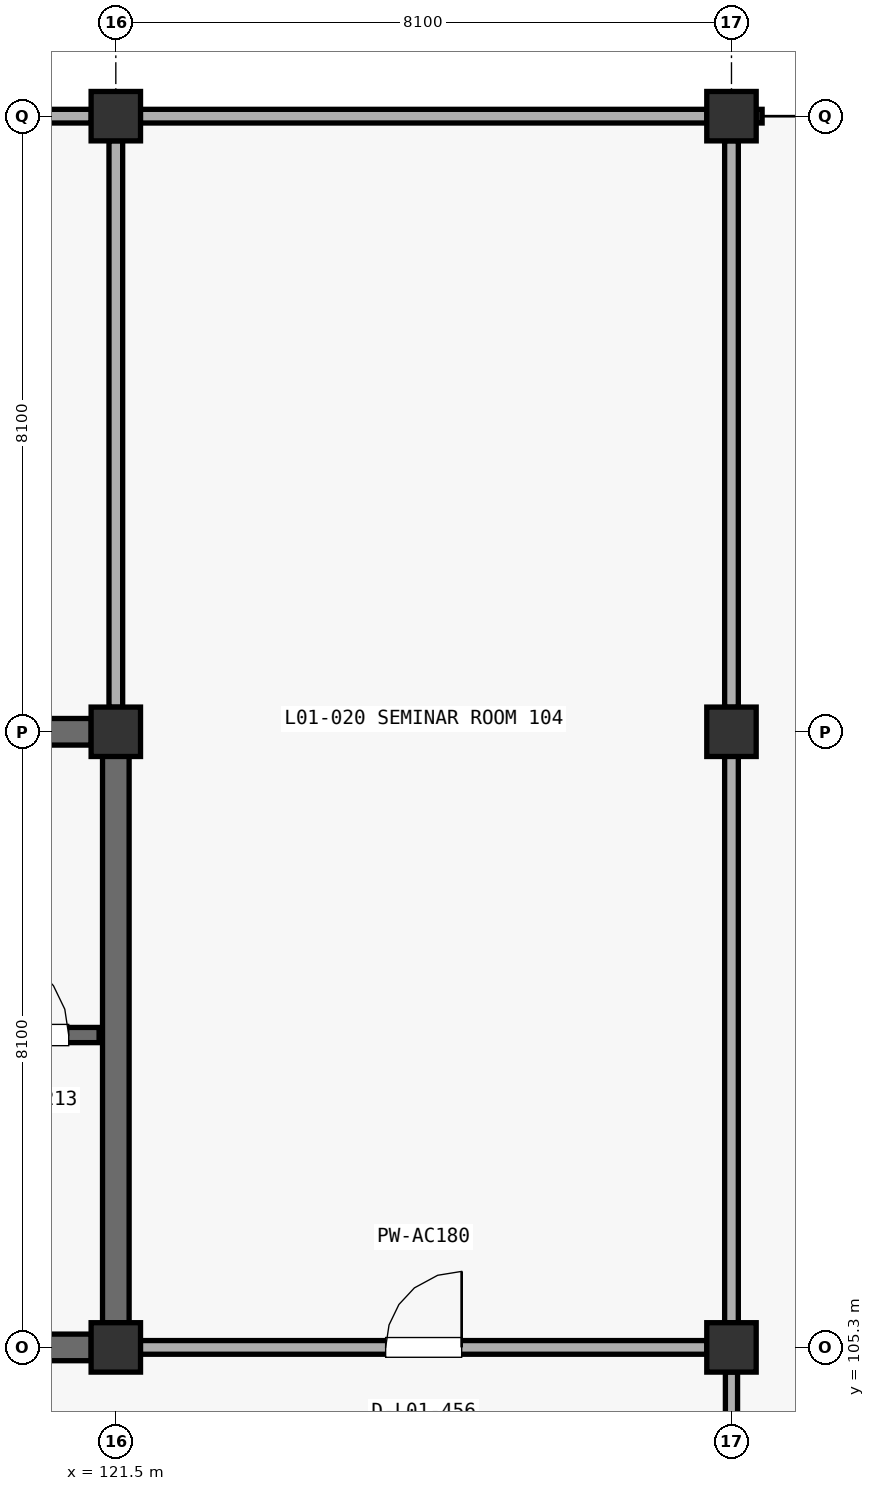
"""IFC4 building model, lengths in metres.
Left out: names, types, materials, properties, quantities, classifications, styles, units other than length and angle.
Written with IfcOpenShell. Run it as: python <this file> out.ifc"""

import sys

from ifc_helpers import new_model, si_unit, direction, frame, frame_2d, origin, origin_2d, place, context, subcontext, project, spatial, rectangle, extrude, element, fill, save


model = new_model("IFC4")
c1 = context("Model", 3, precision=1e-05, world=origin(), true_north=direction((0.0, 1.0)))
c2 = subcontext(c1, "Body", "Model", "MODEL_VIEW")
j1 = project(units=[si_unit("LENGTHUNIT", "METRE"), si_unit("PLANEANGLEUNIT", "RADIAN")], contexts=[c1])
p1 = place(None, origin())
s1 = spatial("IfcSite", under=j1, at=p1, CompositionType="ELEMENT")
p2 = place(p1, origin())
s2 = spatial("IfcBuilding", under=s1, at=p2, CompositionType="ELEMENT")
p3 = place(p2, frame((0.0, 0.0, 5.1)))
s3 = spatial("IfcBuildingStorey", under=s2, at=p3, CompositionType="ELEMENT", Elevation=5.1)
for number, where, z_axis, x_axis in (
    (1, (121.5, 105.3, 0.0), (0.0, 0.0, 1.0), (1.0, 0.0, 0.0)),
    (2, (121.5, 113.4, 0.0), (0.0, 0.0, 1.0), (1.0, 0.0, 0.0)),
    (3, (121.5, 121.5, 0.0), (0.0, 0.0, 1.0), (1.0, 0.0, 0.0)),
    (4, (129.6, 105.3, 0.0), (0.0, 0.0, 1.0), (1.0, 0.0, 0.0)),
    (5, (129.6, 113.4, 0.0), (0.0, 0.0, 1.0), (1.0, 0.0, 0.0)),
    (6, (129.6, 121.5, 0.0), (0.0, 0.0, 1.0), (1.0, 0.0, 0.0)),
):
    element("IfcColumn", number, at=place(p3, frame(where, z_axis=z_axis, x_axis=x_axis)), inside=s3, PredefinedType="COLUMN", context=c2, shape_type="SweptSolid", body=[
        extrude(rectangle(XDim=0.65, YDim=0.65, at=origin_2d()), origin(), (0.0, 0.0, 1.0), 4.59),
    ])
p4 = place(p3, frame((113.723, 113.4, 0.0), z_axis=(0.0, 0.0, 1.0), x_axis=(1.0, 0.0, 0.0)))
e7 = element("IfcWall", 7, at=p4, inside=s3, PredefinedType="SHEAR", context=c2, shape_type="SweptSolid", body=[
    extrude(rectangle(XDim=7.454, YDim=0.35, at=frame_2d((3.727, 0.0))), origin(), (0.0, 0.0, 1.0), 4.252),
])
p5 = place(p3, frame((121.5, 105.623, 0.0), z_axis=(0.0, 0.0, 1.0), x_axis=(0.0, 1.0, 0.0)))
e8 = element("IfcWall", 8, at=p5, inside=s3, PredefinedType="SHEAR", context=c2, shape_type="SweptSolid", body=[
    extrude(rectangle(XDim=7.454, YDim=0.35, at=frame_2d((3.727, 0.0))), origin(), (0.0, 0.0, 1.0), 4.252),
])
p6 = place(p3, frame((113.723, 105.3, 0.0), z_axis=(0.0, 0.0, 1.0), x_axis=(1.0, 0.0, 0.0)))
e9 = element("IfcWall", 9, at=p6, inside=s3, PredefinedType="SHEAR", context=c2, shape_type="SweptSolid", body=[
    extrude(rectangle(XDim=7.454, YDim=0.35, at=frame_2d((3.727, 0.0))), origin(), (0.0, 0.0, 1.0), 4.252),
])
p7 = place(p6, frame((5.204, 0.0, 0.0)))
e10 = element("IfcOpeningElement", 10, at=p7, cuts=e9, PredefinedType="OPENING", context=c2, shape_type="SweptSolid", body=[
    extrude(rectangle(XDim=1.2, YDim=2.2, at=frame_2d((0.6, 1.1))), frame((0.0, 0.185, 0.0), z_axis=(0.0, -1.0, 0.0), x_axis=(1.0, 0.0, 0.0)), (0.0, 0.0, 1.0), 0.37),
])
p8 = place(p3, frame((113.62, 109.41, 0.0), z_axis=(0.0, 0.0, 1.0), x_axis=(1.0, 0.0, 0.0)))
e11 = element("IfcWall", 11, at=p8, inside=s3, PredefinedType="SHEAR", context=c2, shape_type="SweptSolid", body=[
    extrude(rectangle(XDim=7.66, YDim=0.2, at=frame_2d((3.83, 0.0))), origin(), (0.0, 0.0, 1.0), 4.252),
])
p9 = place(p8, frame((6.11, 0.0, 0.0)))
e12 = element("IfcOpeningElement", 12, at=p9, cuts=e11, PredefinedType="OPENING", context=c2, shape_type="SweptSolid", body=[
    extrude(rectangle(XDim=1.15, YDim=2.2, at=frame_2d((0.575, 1.1))), frame((0.0, 0.11, 0.0), z_axis=(0.0, -1.0, 0.0), x_axis=(1.0, 0.0, 0.0)), (0.0, 0.0, 1.0), 0.22),
])
p10 = place(p3, frame((121.823, 105.3, 0.0), z_axis=(0.0, 0.0, 1.0), x_axis=(1.0, 0.0, 0.0)))
e13 = element("IfcWall", 13, at=p10, inside=s3, PredefinedType="PARTITIONING", context=c2, shape_type="SweptSolid", body=[
    extrude(rectangle(XDim=7.454, YDim=0.18, at=frame_2d((3.727, 0.0))), origin(), (0.0, 0.0, 1.0), 3.502),
])
p11 = place(p10, frame((3.227, 0.0, 0.0)))
e14 = element("IfcOpeningElement", 14, at=p11, cuts=e13, PredefinedType="OPENING", context=c2, shape_type="SweptSolid", body=[
    extrude(rectangle(XDim=1.0, YDim=2.15, at=frame_2d((0.5, 1.075))), frame((0.0, 0.1, 0.0), z_axis=(0.0, -1.0, 0.0), x_axis=(1.0, 0.0, 0.0)), (0.0, 0.0, 1.0), 0.2),
])
p12 = place(p3, frame((129.6, 105.623, 0.0), z_axis=(0.0, 0.0, 1.0), x_axis=(0.0, 1.0, 0.0)))
e15 = element("IfcWall", 15, at=p12, inside=s3, PredefinedType="PARTITIONING", context=c2, shape_type="SweptSolid", body=[
    extrude(rectangle(XDim=7.454, YDim=0.18, at=frame_2d((3.727, 0.0))), origin(), (0.0, 0.0, 1.0), 3.652),
])
p13 = place(p3, frame((129.6, 113.723, 0.0), z_axis=(0.0, 0.0, 1.0), x_axis=(0.0, 1.0, 0.0)))
e16 = element("IfcWall", 16, at=p13, inside=s3, PredefinedType="PARTITIONING", context=c2, shape_type="SweptSolid", body=[
    extrude(rectangle(XDim=7.454, YDim=0.18, at=frame_2d((3.727, 0.0))), origin(), (0.0, 0.0, 1.0), 3.402),
])
for number, where, z_axis, x_axis in (
    (17, (121.5, 113.723, 0.0), (0.0, 0.0, 1.0), (0.0, 1.0, 0.0)),
    (18, (121.823, 121.5, 0.0), (0.0, 0.0, 1.0), (1.0, 0.0, 0.0)),
):
    element("IfcWall", number, at=place(p3, frame(where, z_axis=z_axis, x_axis=x_axis)), inside=s3, PredefinedType="PARTITIONING", context=c2, shape_type="SweptSolid", body=[
        extrude(rectangle(XDim=7.454, YDim=0.18, at=frame_2d((3.727, 0.0))), origin(), (0.0, 0.0, 1.0), 3.602),
    ])
p14 = place(p3, frame((129.6, 97.523, 0.0), z_axis=(0.0, 0.0, 1.0), x_axis=(0.0, 1.0, 0.0)))
e19 = element("IfcWall", 19, at=p14, inside=s3, PredefinedType="PARTITIONING", context=c2, shape_type="SweptSolid", body=[
    extrude(rectangle(XDim=7.454, YDim=0.16, at=frame_2d((3.727, 0.0))), origin(), (0.0, 0.0, 1.0), 3.602),
])
p15 = place(p3, frame((113.723, 121.5, 0.0), z_axis=(0.0, 0.0, 1.0), x_axis=(1.0, 0.0, 0.0)))
e20 = element("IfcWall", 20, at=p15, inside=s3, PredefinedType="PARTITIONING", context=c2, shape_type="SweptSolid", body=[
    extrude(rectangle(XDim=7.454, YDim=0.18, at=frame_2d((3.727, 0.0))), origin(), (0.0, 0.0, 1.0), 3.602),
])
p16 = place(p9, origin())
e21 = element("IfcDoor", 21, at=p16, inside=s3, OperationType="SINGLE_SWING_LEFT", PredefinedType="DOOR", context=c2, shape_type="SweptSolid", body=[
    extrude(rectangle(XDim=1.15, YDim=2.2, at=frame_2d((0.575, 1.1))), frame((0.0, 0.025, 0.0), z_axis=(0.0, -1.0, 0.0), x_axis=(1.0, 0.0, 0.0)), (0.0, 0.0, 1.0), 0.05),
])
fill(e12, e21)
p17 = place(p11, origin())
e22 = element("IfcDoor", 22, at=p17, inside=s3, OperationType="SINGLE_SWING_RIGHT", PredefinedType="DOOR", context=c2, shape_type="SweptSolid", body=[
    extrude(rectangle(XDim=1.0, YDim=2.15, at=frame_2d((0.5, 1.075))), frame((0.0, 0.025, 0.0), z_axis=(0.0, -1.0, 0.0), x_axis=(1.0, 0.0, 0.0)), (0.0, 0.0, 1.0), 0.05),
])
fill(e14, e22)
save(model, sys.argv[1])
